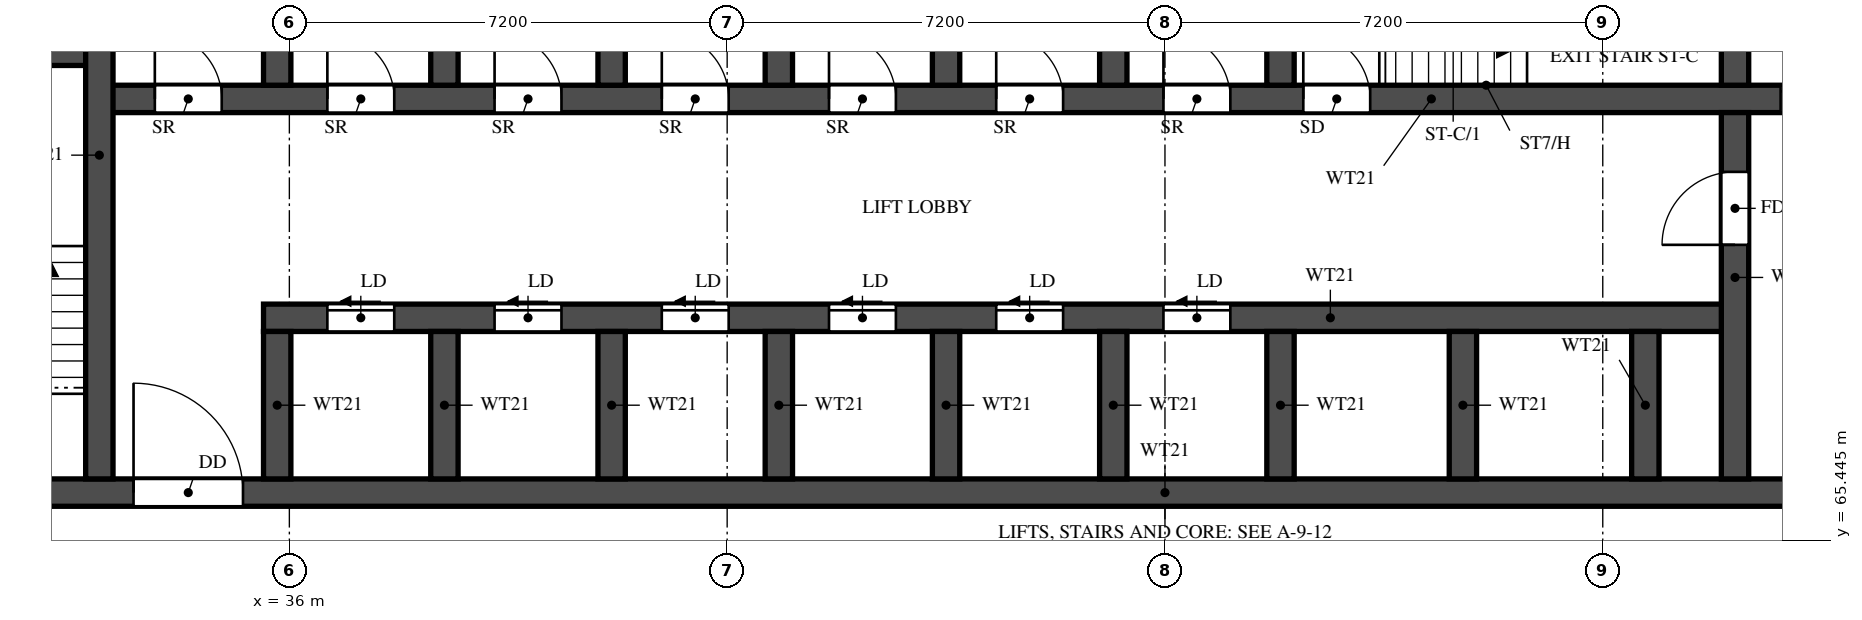
"""IFC4 building model, lengths in metres.
Left out: names, types, materials, properties, quantities, classifications, styles, units other than length and angle.
Written with IfcOpenShell. Run it as: python <this file> out.ifc"""

import sys

from ifc_helpers import new_model, si_unit, direction, frame, frame_2d, origin, place, context, subcontext, project, spatial, rectangle, extrude, element, fill, save


model = new_model("IFC4")
c1 = context("Model", 3, precision=1e-05, world=origin(), true_north=direction((0.0, 1.0)))
c2 = subcontext(c1, "Body", "Model", "MODEL_VIEW")
j1 = project(units=[si_unit("LENGTHUNIT", "METRE"), si_unit("PLANEANGLEUNIT", "RADIAN")], contexts=[c1])
p1 = place(None, origin())
s1 = spatial("IfcSite", under=j1, at=p1, CompositionType="ELEMENT")
p2 = place(p1, origin())
s2 = spatial("IfcBuilding", under=s1, at=p2, CompositionType="ELEMENT")
p3 = place(p2, frame((0.0, 0.0, 79.5)))
s3 = spatial("IfcBuildingStorey", under=s2, at=p3, CompositionType="ELEMENT", Elevation=79.5)
p4 = place(p3, frame((29.7, 66.225, 0.0), z_axis=(0.0, 0.0, 1.0), x_axis=(1.0, 0.0, 0.0)))
e1 = element("IfcWall", 1, at=p4, inside=s3, PredefinedType="SHEAR", context=c2, shape_type="SweptSolid", body=[
    extrude(rectangle(XDim=41.4, YDim=0.45, at=frame_2d((20.7, 0.0))), origin(), (0.0, 0.0, 1.0), 3.18),
])
p5 = place(p4, frame((0.925, 0.0, 0.0)))
e2 = element("IfcOpeningElement", 2, at=p5, cuts=e1, PredefinedType="OPENING", context=c2, shape_type="SweptSolid", body=[
    extrude(rectangle(XDim=1.1, YDim=2.1, at=frame_2d((0.55, 1.05))), frame((0.0, 0.235, 0.0), z_axis=(0.0, -1.0, 0.0), x_axis=(1.0, 0.0, 0.0)), (0.0, 0.0, 1.0), 0.47),
])
p6 = place(p4, frame((3.738, 0.0, 0.0)))
e3 = element("IfcOpeningElement", 3, at=p6, cuts=e1, PredefinedType="OPENING", context=c2, shape_type="SweptSolid", body=[
    extrude(rectangle(XDim=1.8, YDim=2.1, at=frame_2d((0.9, 1.05))), frame((0.0, 0.235, 0.0), z_axis=(0.0, -1.0, 0.0), x_axis=(1.0, 0.0, 0.0)), (0.0, 0.0, 1.0), 0.47),
])
p7 = place(p3, frame((35.575, 69.1, 0.0), z_axis=(0.0, 0.0, 1.0), x_axis=(1.0, 0.0, 0.0)))
e4 = element("IfcWall", 4, at=p7, inside=s3, PredefinedType="SHEAR", context=c2, shape_type="SweptSolid", body=[
    extrude(rectangle(XDim=24.2, YDim=0.45, at=frame_2d((12.1, 0.0))), origin(), (0.0, 0.0, 1.0), 3.18),
])
p8 = place(p7, frame((1.05, 0.0, 0.0)))
e5 = element("IfcOpeningElement", 5, at=p8, cuts=e4, PredefinedType="OPENING", context=c2, shape_type="SweptSolid", body=[
    extrude(rectangle(XDim=1.1, YDim=2.1, at=frame_2d((0.55, 1.05))), frame((0.0, 0.235, 0.0), z_axis=(0.0, -1.0, 0.0), x_axis=(1.0, 0.0, 0.0)), (0.0, 0.0, 1.0), 0.47),
])
p9 = place(p7, frame((3.8, 0.0, 0.0)))
e6 = element("IfcOpeningElement", 6, at=p9, cuts=e4, PredefinedType="OPENING", context=c2, shape_type="SweptSolid", body=[
    extrude(rectangle(XDim=1.1, YDim=2.1, at=frame_2d((0.55, 1.05))), frame((0.0, 0.235, 0.0), z_axis=(0.0, -1.0, 0.0), x_axis=(1.0, 0.0, 0.0)), (0.0, 0.0, 1.0), 0.47),
])
p10 = place(p7, frame((6.55, 0.0, 0.0)))
e7 = element("IfcOpeningElement", 7, at=p10, cuts=e4, PredefinedType="OPENING", context=c2, shape_type="SweptSolid", body=[
    extrude(rectangle(XDim=1.1, YDim=2.1, at=frame_2d((0.55, 1.05))), frame((0.0, 0.235, 0.0), z_axis=(0.0, -1.0, 0.0), x_axis=(1.0, 0.0, 0.0)), (0.0, 0.0, 1.0), 0.47),
])
p11 = place(p7, frame((9.3, 0.0, 0.0)))
e8 = element("IfcOpeningElement", 8, at=p11, cuts=e4, PredefinedType="OPENING", context=c2, shape_type="SweptSolid", body=[
    extrude(rectangle(XDim=1.1, YDim=2.1, at=frame_2d((0.55, 1.05))), frame((0.0, 0.235, 0.0), z_axis=(0.0, -1.0, 0.0), x_axis=(1.0, 0.0, 0.0)), (0.0, 0.0, 1.0), 0.47),
])
p12 = place(p7, frame((12.05, 0.0, 0.0)))
e9 = element("IfcOpeningElement", 9, at=p12, cuts=e4, PredefinedType="OPENING", context=c2, shape_type="SweptSolid", body=[
    extrude(rectangle(XDim=1.1, YDim=2.1, at=frame_2d((0.55, 1.05))), frame((0.0, 0.235, 0.0), z_axis=(0.0, -1.0, 0.0), x_axis=(1.0, 0.0, 0.0)), (0.0, 0.0, 1.0), 0.47),
])
p13 = place(p7, frame((14.8, 0.0, 0.0)))
e10 = element("IfcOpeningElement", 10, at=p13, cuts=e4, PredefinedType="OPENING", context=c2, shape_type="SweptSolid", body=[
    extrude(rectangle(XDim=1.1, YDim=2.1, at=frame_2d((0.55, 1.05))), frame((0.0, 0.235, 0.0), z_axis=(0.0, -1.0, 0.0), x_axis=(1.0, 0.0, 0.0)), (0.0, 0.0, 1.0), 0.47),
])
p14 = place(p3, frame((32.875, 72.7, 0.0), z_axis=(0.0, 0.0, 1.0), x_axis=(1.0, 0.0, 0.0)))
e11 = element("IfcWall", 11, at=p14, inside=s3, PredefinedType="SHEAR", context=c2, shape_type="SweptSolid", body=[
    extrude(rectangle(XDim=35.05, YDim=0.45, at=frame_2d((17.525, 0.0))), origin(), (0.0, 0.0, 1.0), 3.18),
])
p15 = place(p14, frame((19.8, 0.0, 0.0)))
e12 = element("IfcOpeningElement", 12, at=p15, cuts=e11, PredefinedType="OPENING", context=c2, shape_type="SweptSolid", body=[
    extrude(rectangle(XDim=1.1, YDim=2.1, at=frame_2d((0.55, 1.05))), frame((0.0, 0.235, 0.0), z_axis=(0.0, -1.0, 0.0), x_axis=(1.0, 0.0, 0.0)), (0.0, 0.0, 1.0), 0.47),
])
p16 = place(p14, frame((27.65, 0.0, 0.0)))
e13 = element("IfcOpeningElement", 13, at=p16, cuts=e11, PredefinedType="OPENING", context=c2, shape_type="SweptSolid", body=[
    extrude(rectangle(XDim=1.1, YDim=2.1, at=frame_2d((0.55, 1.05))), frame((0.0, 0.235, 0.0), z_axis=(0.0, -1.0, 0.0), x_axis=(1.0, 0.0, 0.0)), (0.0, 0.0, 1.0), 0.47),
])
p17 = place(p14, frame((30.25, 0.0, 0.0)))
e14 = element("IfcOpeningElement", 14, at=p17, cuts=e11, PredefinedType="OPENING", context=c2, shape_type="SweptSolid", body=[
    extrude(rectangle(XDim=1.1, YDim=2.1, at=frame_2d((0.55, 1.05))), frame((0.0, 0.235, 0.0), z_axis=(0.0, -1.0, 0.0), x_axis=(1.0, 0.0, 0.0)), (0.0, 0.0, 1.0), 0.47),
])
p18 = place(p14, frame((3.75, 0.0, 0.0)))
e15 = element("IfcOpeningElement", 15, at=p18, cuts=e11, PredefinedType="OPENING", context=c2, shape_type="SweptSolid", body=[
    extrude(rectangle(XDim=1.1, YDim=2.1, at=frame_2d((0.55, 1.05))), frame((0.0, 0.235, 0.0), z_axis=(0.0, -1.0, 0.0), x_axis=(1.0, 0.0, 0.0)), (0.0, 0.0, 1.0), 0.47),
])
p19 = place(p14, frame((6.5, 0.0, 0.0)))
e16 = element("IfcOpeningElement", 16, at=p19, cuts=e11, PredefinedType="OPENING", context=c2, shape_type="SweptSolid", body=[
    extrude(rectangle(XDim=1.1, YDim=2.1, at=frame_2d((0.55, 1.05))), frame((0.0, 0.235, 0.0), z_axis=(0.0, -1.0, 0.0), x_axis=(1.0, 0.0, 0.0)), (0.0, 0.0, 1.0), 0.47),
])
p20 = place(p14, frame((9.25, 0.0, 0.0)))
e17 = element("IfcOpeningElement", 17, at=p20, cuts=e11, PredefinedType="OPENING", context=c2, shape_type="SweptSolid", body=[
    extrude(rectangle(XDim=1.1, YDim=2.1, at=frame_2d((0.55, 1.05))), frame((0.0, 0.235, 0.0), z_axis=(0.0, -1.0, 0.0), x_axis=(1.0, 0.0, 0.0)), (0.0, 0.0, 1.0), 0.47),
])
p21 = place(p14, frame((12.0, 0.0, 0.0)))
e18 = element("IfcOpeningElement", 18, at=p21, cuts=e11, PredefinedType="OPENING", context=c2, shape_type="SweptSolid", body=[
    extrude(rectangle(XDim=1.1, YDim=2.1, at=frame_2d((0.55, 1.05))), frame((0.0, 0.235, 0.0), z_axis=(0.0, -1.0, 0.0), x_axis=(1.0, 0.0, 0.0)), (0.0, 0.0, 1.0), 0.47),
])
p22 = place(p14, frame((14.75, 0.0, 0.0)))
e19 = element("IfcOpeningElement", 19, at=p22, cuts=e11, PredefinedType="OPENING", context=c2, shape_type="SweptSolid", body=[
    extrude(rectangle(XDim=1.1, YDim=2.1, at=frame_2d((0.55, 1.05))), frame((0.0, 0.235, 0.0), z_axis=(0.0, -1.0, 0.0), x_axis=(1.0, 0.0, 0.0)), (0.0, 0.0, 1.0), 0.47),
])
p23 = place(p14, frame((17.5, 0.0, 0.0)))
e20 = element("IfcOpeningElement", 20, at=p23, cuts=e11, PredefinedType="OPENING", context=c2, shape_type="SweptSolid", body=[
    extrude(rectangle(XDim=1.1, YDim=2.1, at=frame_2d((0.55, 1.05))), frame((0.0, 0.235, 0.0), z_axis=(0.0, -1.0, 0.0), x_axis=(1.0, 0.0, 0.0)), (0.0, 0.0, 1.0), 0.47),
])
p24 = place(p14, frame((0.913, 0.0, 0.0)))
e21 = element("IfcOpeningElement", 21, at=p24, cuts=e11, PredefinedType="OPENING", context=c2, shape_type="SweptSolid", body=[
    extrude(rectangle(XDim=1.1, YDim=2.1, at=frame_2d((0.55, 1.05))), frame((0.0, 0.235, 0.0), z_axis=(0.0, -1.0, 0.0), x_axis=(1.0, 0.0, 0.0)), (0.0, 0.0, 1.0), 0.47),
])
p25 = place(p3, frame((29.7, 73.475, 0.0), z_axis=(0.0, 0.0, 1.0), x_axis=(1.0, 0.0, 0.0)))
e22 = element("IfcWall", 22, at=p25, inside=s3, PredefinedType="SHEAR", context=c2, shape_type="SweptSolid", body=[
    extrude(rectangle(XDim=3.175, YDim=0.45, at=frame_2d((1.587, 0.0))), origin(), (0.0, 0.0, 1.0), 3.18),
])
p26 = place(p3, frame((32.875, 66.45, 0.0), z_axis=(0.0, 0.0, 1.0), x_axis=(0.0, 1.0, 0.0)))
e23 = element("IfcWall", 23, at=p26, inside=s3, PredefinedType="SHEAR", context=c2, shape_type="SweptSolid", body=[
    extrude(rectangle(XDim=10.65, YDim=0.45, at=frame_2d((5.325, 0.0))), origin(), (0.0, 0.0, 1.0), 3.18),
])
p27 = place(p3, frame((59.775, 66.45, 0.0), z_axis=(0.0, 0.0, 1.0), x_axis=(0.0, 1.0, 0.0)))
e24 = element("IfcWall", 24, at=p27, inside=s3, PredefinedType="SHEAR", context=c2, shape_type="SweptSolid", body=[
    extrude(rectangle(XDim=6.025, YDim=0.45, at=frame_2d((3.013, 0.0))), origin(), (0.0, 0.0, 1.0), 3.18),
])
p28 = place(p27, frame((3.85, 0.0, 0.0)))
e25 = element("IfcOpeningElement", 25, at=p28, cuts=e24, PredefinedType="OPENING", context=c2, shape_type="SweptSolid", body=[
    extrude(rectangle(XDim=1.2, YDim=2.1, at=frame_2d((0.6, 1.05))), frame((0.0, 0.235, 0.0), z_axis=(0.0, -1.0, 0.0), x_axis=(1.0, 0.0, 0.0)), (0.0, 0.0, 1.0), 0.47),
])
p29 = place(p3, frame((59.775, 72.925, 0.0), z_axis=(0.0, 0.0, 1.0), x_axis=(0.0, 1.0, 0.0)))
e26 = element("IfcWall", 26, at=p29, inside=s3, PredefinedType="SHEAR", context=c2, shape_type="SweptSolid", body=[
    extrude(rectangle(XDim=2.95, YDim=0.45, at=frame_2d((1.475, 0.0))), origin(), (0.0, 0.0, 1.0), 3.18),
])
for number, where, z_axis, x_axis in (
    (27, (35.8, 66.45, 0.0), (0.0, 0.0, 1.0), (0.0, 1.0, 0.0)),
    (28, (38.55, 66.45, 0.0), (0.0, 0.0, 1.0), (0.0, 1.0, 0.0)),
    (29, (41.3, 66.45, 0.0), (0.0, 0.0, 1.0), (0.0, 1.0, 0.0)),
    (30, (44.05, 66.45, 0.0), (0.0, 0.0, 1.0), (0.0, 1.0, 0.0)),
    (31, (46.8, 66.45, 0.0), (0.0, 0.0, 1.0), (0.0, 1.0, 0.0)),
    (32, (49.55, 66.45, 0.0), (0.0, 0.0, 1.0), (0.0, 1.0, 0.0)),
    (33, (52.3, 66.45, 0.0), (0.0, 0.0, 1.0), (0.0, 1.0, 0.0)),
    (34, (55.3, 66.45, 0.0), (0.0, 0.0, 1.0), (0.0, 1.0, 0.0)),
    (35, (58.3, 66.45, 0.0), (0.0, 0.0, 1.0), (0.0, 1.0, 0.0)),
):
    element("IfcWall", number, at=place(p3, frame(where, z_axis=z_axis, x_axis=x_axis)), inside=s3, PredefinedType="SHEAR", context=c2, shape_type="SweptSolid", body=[
        extrude(rectangle(XDim=2.425, YDim=0.45, at=frame_2d((1.212, 0.0))), origin(), (0.0, 0.0, 1.0), 3.18),
    ])
for number, where, z_axis, x_axis in (
    (36, (35.8, 72.925, 0.0), (0.0, 0.0, 1.0), (0.0, 1.0, 0.0)),
    (37, (38.55, 72.925, 0.0), (0.0, 0.0, 1.0), (0.0, 1.0, 0.0)),
    (38, (41.3, 72.925, 0.0), (0.0, 0.0, 1.0), (0.0, 1.0, 0.0)),
    (39, (44.05, 72.925, 0.0), (0.0, 0.0, 1.0), (0.0, 1.0, 0.0)),
    (40, (46.8, 72.925, 0.0), (0.0, 0.0, 1.0), (0.0, 1.0, 0.0)),
    (41, (49.55, 72.925, 0.0), (0.0, 0.0, 1.0), (0.0, 1.0, 0.0)),
    (42, (52.3, 72.925, 0.0), (0.0, 0.0, 1.0), (0.0, 1.0, 0.0)),
):
    element("IfcWall", number, at=place(p3, frame(where, z_axis=z_axis, x_axis=x_axis)), inside=s3, PredefinedType="SHEAR", context=c2, shape_type="SweptSolid", body=[
        extrude(rectangle(XDim=2.95, YDim=0.45, at=frame_2d((1.475, 0.0))), origin(), (0.0, 0.0, 1.0), 3.18),
    ])
p30 = place(p15, origin())
e43 = element("IfcDoor", 43, at=p30, inside=s3, OperationType="SINGLE_SWING_LEFT", PredefinedType="DOOR", context=c2, shape_type="SweptSolid", body=[
    extrude(rectangle(XDim=1.1, YDim=2.1, at=frame_2d((0.55, 1.05))), frame((0.0, 0.025, 0.0), z_axis=(0.0, -1.0, 0.0), x_axis=(1.0, 0.0, 0.0)), (0.0, 0.0, 1.0), 0.05),
])
fill(e12, e43)
p31 = place(p6, origin())
e44 = element("IfcDoor", 44, at=p31, inside=s3, OperationType="DOUBLE_DOOR_SINGLE_SWING", PredefinedType="DOOR", context=c2, shape_type="SweptSolid", body=[
    extrude(rectangle(XDim=1.8, YDim=2.1, at=frame_2d((0.9, 1.05))), frame((0.0, 0.025, 0.0), z_axis=(0.0, -1.0, 0.0), x_axis=(1.0, 0.0, 0.0)), (0.0, 0.0, 1.0), 0.05),
])
fill(e3, e44)
p32 = place(p28, origin())
e45 = element("IfcDoor", 45, at=p32, inside=s3, OperationType="SINGLE_SWING_RIGHT", PredefinedType="DOOR", context=c2, shape_type="SweptSolid", body=[
    extrude(rectangle(XDim=1.2, YDim=2.1, at=frame_2d((0.6, 1.05))), frame((0.0, 0.025, 0.0), z_axis=(0.0, -1.0, 0.0), x_axis=(1.0, 0.0, 0.0)), (0.0, 0.0, 1.0), 0.05),
])
fill(e25, e45)
p33 = place(p16, origin())
e46 = element("IfcDoor", 46, at=p33, inside=s3, OperationType="SLIDING_TO_LEFT", PredefinedType="DOOR", context=c2, shape_type="SweptSolid", body=[
    extrude(rectangle(XDim=1.1, YDim=2.1, at=frame_2d((0.55, 1.05))), frame((0.0, 0.025, 0.0), z_axis=(0.0, -1.0, 0.0), x_axis=(1.0, 0.0, 0.0)), (0.0, 0.0, 1.0), 0.05),
])
fill(e13, e46)
p34 = place(p8, origin())
e47 = element("IfcDoor", 47, at=p34, inside=s3, OperationType="SLIDING_TO_LEFT", PredefinedType="DOOR", context=c2, shape_type="SweptSolid", body=[
    extrude(rectangle(XDim=1.1, YDim=2.1, at=frame_2d((0.55, 1.05))), frame((0.0, 0.025, 0.0), z_axis=(0.0, -1.0, 0.0), x_axis=(1.0, 0.0, 0.0)), (0.0, 0.0, 1.0), 0.05),
])
fill(e5, e47)
p35 = place(p9, origin())
e48 = element("IfcDoor", 48, at=p35, inside=s3, OperationType="SLIDING_TO_LEFT", PredefinedType="DOOR", context=c2, shape_type="SweptSolid", body=[
    extrude(rectangle(XDim=1.1, YDim=2.1, at=frame_2d((0.55, 1.05))), frame((0.0, 0.025, 0.0), z_axis=(0.0, -1.0, 0.0), x_axis=(1.0, 0.0, 0.0)), (0.0, 0.0, 1.0), 0.05),
])
fill(e6, e48)
p36 = place(p10, origin())
e49 = element("IfcDoor", 49, at=p36, inside=s3, OperationType="SLIDING_TO_LEFT", PredefinedType="DOOR", context=c2, shape_type="SweptSolid", body=[
    extrude(rectangle(XDim=1.1, YDim=2.1, at=frame_2d((0.55, 1.05))), frame((0.0, 0.025, 0.0), z_axis=(0.0, -1.0, 0.0), x_axis=(1.0, 0.0, 0.0)), (0.0, 0.0, 1.0), 0.05),
])
fill(e7, e49)
p37 = place(p11, origin())
e50 = element("IfcDoor", 50, at=p37, inside=s3, OperationType="SLIDING_TO_LEFT", PredefinedType="DOOR", context=c2, shape_type="SweptSolid", body=[
    extrude(rectangle(XDim=1.1, YDim=2.1, at=frame_2d((0.55, 1.05))), frame((0.0, 0.025, 0.0), z_axis=(0.0, -1.0, 0.0), x_axis=(1.0, 0.0, 0.0)), (0.0, 0.0, 1.0), 0.05),
])
fill(e8, e50)
p38 = place(p12, origin())
e51 = element("IfcDoor", 51, at=p38, inside=s3, OperationType="SLIDING_TO_LEFT", PredefinedType="DOOR", context=c2, shape_type="SweptSolid", body=[
    extrude(rectangle(XDim=1.1, YDim=2.1, at=frame_2d((0.55, 1.05))), frame((0.0, 0.025, 0.0), z_axis=(0.0, -1.0, 0.0), x_axis=(1.0, 0.0, 0.0)), (0.0, 0.0, 1.0), 0.05),
])
fill(e9, e51)
p39 = place(p13, origin())
e52 = element("IfcDoor", 52, at=p39, inside=s3, OperationType="SLIDING_TO_LEFT", PredefinedType="DOOR", context=c2, shape_type="SweptSolid", body=[
    extrude(rectangle(XDim=1.1, YDim=2.1, at=frame_2d((0.55, 1.05))), frame((0.0, 0.025, 0.0), z_axis=(0.0, -1.0, 0.0), x_axis=(1.0, 0.0, 0.0)), (0.0, 0.0, 1.0), 0.05),
])
fill(e10, e52)
p40 = place(p18, origin())
e53 = element("IfcDoor", 53, at=p40, inside=s3, OperationType="SINGLE_SWING_LEFT", PredefinedType="DOOR", context=c2, shape_type="SweptSolid", body=[
    extrude(rectangle(XDim=1.1, YDim=2.1, at=frame_2d((0.55, 1.05))), frame((0.0, 0.025, 0.0), z_axis=(0.0, -1.0, 0.0), x_axis=(1.0, 0.0, 0.0)), (0.0, 0.0, 1.0), 0.05),
])
fill(e15, e53)
p41 = place(p19, origin())
e54 = element("IfcDoor", 54, at=p41, inside=s3, OperationType="SINGLE_SWING_LEFT", PredefinedType="DOOR", context=c2, shape_type="SweptSolid", body=[
    extrude(rectangle(XDim=1.1, YDim=2.1, at=frame_2d((0.55, 1.05))), frame((0.0, 0.025, 0.0), z_axis=(0.0, -1.0, 0.0), x_axis=(1.0, 0.0, 0.0)), (0.0, 0.0, 1.0), 0.05),
])
fill(e16, e54)
p42 = place(p20, origin())
e55 = element("IfcDoor", 55, at=p42, inside=s3, OperationType="SINGLE_SWING_LEFT", PredefinedType="DOOR", context=c2, shape_type="SweptSolid", body=[
    extrude(rectangle(XDim=1.1, YDim=2.1, at=frame_2d((0.55, 1.05))), frame((0.0, 0.025, 0.0), z_axis=(0.0, -1.0, 0.0), x_axis=(1.0, 0.0, 0.0)), (0.0, 0.0, 1.0), 0.05),
])
fill(e17, e55)
p43 = place(p21, origin())
e56 = element("IfcDoor", 56, at=p43, inside=s3, OperationType="SINGLE_SWING_LEFT", PredefinedType="DOOR", context=c2, shape_type="SweptSolid", body=[
    extrude(rectangle(XDim=1.1, YDim=2.1, at=frame_2d((0.55, 1.05))), frame((0.0, 0.025, 0.0), z_axis=(0.0, -1.0, 0.0), x_axis=(1.0, 0.0, 0.0)), (0.0, 0.0, 1.0), 0.05),
])
fill(e18, e56)
p44 = place(p22, origin())
e57 = element("IfcDoor", 57, at=p44, inside=s3, OperationType="SINGLE_SWING_LEFT", PredefinedType="DOOR", context=c2, shape_type="SweptSolid", body=[
    extrude(rectangle(XDim=1.1, YDim=2.1, at=frame_2d((0.55, 1.05))), frame((0.0, 0.025, 0.0), z_axis=(0.0, -1.0, 0.0), x_axis=(1.0, 0.0, 0.0)), (0.0, 0.0, 1.0), 0.05),
])
fill(e19, e57)
p45 = place(p23, origin())
e58 = element("IfcDoor", 58, at=p45, inside=s3, OperationType="SINGLE_SWING_LEFT", PredefinedType="DOOR", context=c2, shape_type="SweptSolid", body=[
    extrude(rectangle(XDim=1.1, YDim=2.1, at=frame_2d((0.55, 1.05))), frame((0.0, 0.025, 0.0), z_axis=(0.0, -1.0, 0.0), x_axis=(1.0, 0.0, 0.0)), (0.0, 0.0, 1.0), 0.05),
])
fill(e20, e58)
p46 = place(p24, origin())
e59 = element("IfcDoor", 59, at=p46, inside=s3, OperationType="SINGLE_SWING_LEFT", PredefinedType="DOOR", context=c2, shape_type="SweptSolid", body=[
    extrude(rectangle(XDim=1.1, YDim=2.1, at=frame_2d((0.55, 1.05))), frame((0.0, 0.025, 0.0), z_axis=(0.0, -1.0, 0.0), x_axis=(1.0, 0.0, 0.0)), (0.0, 0.0, 1.0), 0.05),
])
fill(e21, e59)
save(model, sys.argv[1])
